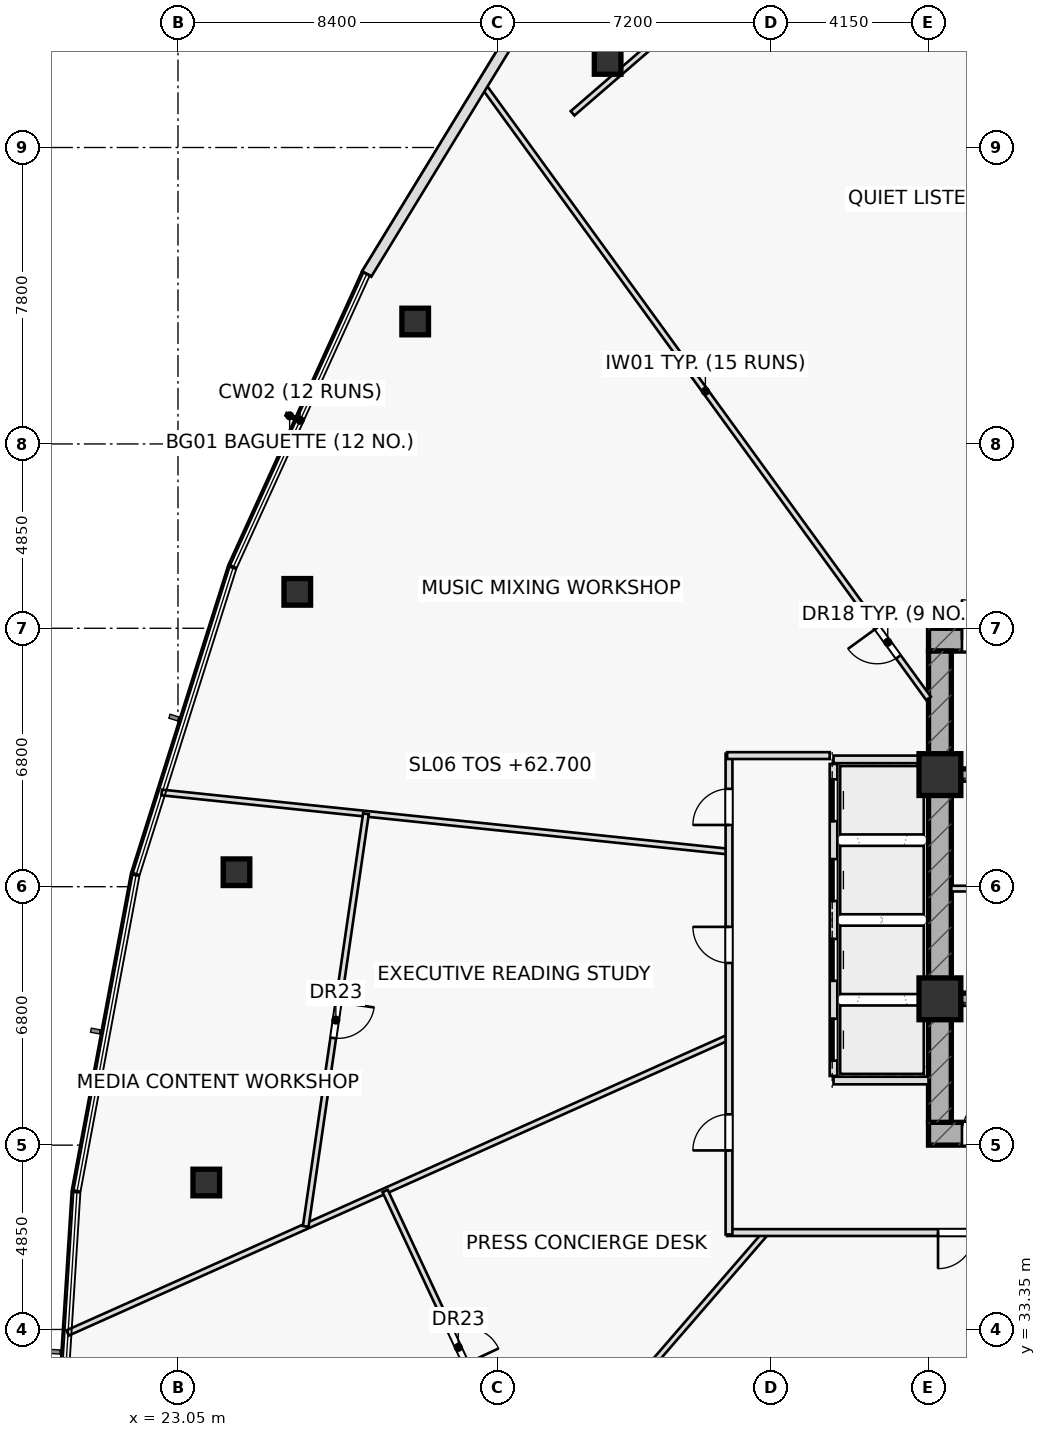
"""IFC4 building model, lengths in metres.
Left out: names, types, materials, properties, quantities, classifications, styles, units other than length and angle.
Written with IfcOpenShell. Run it as: python <this file> out.ifc"""

import sys

from ifc_helpers import new_model, si_unit, direction, frame, frame_2d, origin, origin_2d, place, context, subcontext, project, spatial, rectangle, hollow_rectangle, extrude, element, fill, save


model = new_model("IFC4")
c1 = context("Model", 3, precision=1e-05, world=origin(), true_north=direction((0.0, 1.0)))
c2 = subcontext(c1, "Body", "Model", "MODEL_VIEW")
j1 = project(units=[si_unit("LENGTHUNIT", "METRE"), si_unit("PLANEANGLEUNIT", "RADIAN")], contexts=[c1])
p1 = place(None, origin())
s1 = spatial("IfcSite", under=j1, at=p1, CompositionType="ELEMENT")
p2 = place(p1, origin())
s2 = spatial("IfcBuilding", under=s1, at=p2, CompositionType="ELEMENT")
p3 = place(p2, frame((0.0, 0.0, 62.7)))
s3 = spatial("IfcBuildingStorey", under=s2, at=p3, CompositionType="ELEMENT", Elevation=62.7)
p4 = place(p3, frame((42.8, 51.5, 0.0), z_axis=(0.0, 0.0, 1.0), x_axis=(1.0, 0.0, 0.0)))
e1 = element("IfcWall", 1, at=p4, inside=s3, PredefinedType="SHEAR", context=c2, shape_type="SweptSolid", body=[
    extrude(rectangle(XDim=14.4, YDim=0.6, at=frame_2d((7.2, 0.0))), origin(), (0.0, 0.0, 1.0), 3.6),
])
p5 = place(p4, frame((0.88, 0.0, 0.0)))
e2 = element("IfcOpeningElement", 2, at=p5, cuts=e1, PredefinedType="OPENING", context=c2, shape_type="SweptSolid", body=[
    extrude(rectangle(XDim=1.05, YDim=2.2, at=frame_2d((0.525, 1.1))), frame((0.0, 0.31, 0.0), z_axis=(0.0, -1.0, 0.0), x_axis=(1.0, 0.0, 0.0)), (0.0, 0.0, 1.0), 0.62),
])
p6 = place(p3, frame((42.8, 38.5, 0.0), z_axis=(0.0, 0.0, 1.0), x_axis=(1.0, 0.0, 0.0)))
e3 = element("IfcWall", 3, at=p6, inside=s3, PredefinedType="SHEAR", context=c2, shape_type="SweptSolid", body=[
    extrude(rectangle(XDim=14.4, YDim=0.6, at=frame_2d((7.2, 0.0))), origin(), (0.0, 0.0, 1.0), 3.6),
])
p7 = place(p6, frame((0.88, 0.0, 0.0)))
e4 = element("IfcOpeningElement", 4, at=p7, cuts=e3, PredefinedType="OPENING", context=c2, shape_type="SweptSolid", body=[
    extrude(rectangle(XDim=1.05, YDim=2.2, at=frame_2d((0.525, 1.1))), frame((0.0, 0.31, 0.0), z_axis=(0.0, -1.0, 0.0), x_axis=(1.0, 0.0, 0.0)), (0.0, 0.0, 1.0), 0.62),
])
p8 = place(p3, frame((43.1, 38.8, 0.0), z_axis=(0.0, 0.0, 1.0), x_axis=(0.0, 1.0, 0.0)))
e5 = element("IfcWall", 5, at=p8, inside=s3, PredefinedType="SHEAR", context=c2, shape_type="SweptSolid", body=[
    extrude(rectangle(XDim=12.4, YDim=0.6, at=frame_2d((6.2, 0.0))), origin(), (0.0, 0.0, 1.0), 3.6),
])
p9 = place(p3, frame((43.4, 47.95, 0.0), z_axis=(0.0, 0.0, 1.0), x_axis=(1.0, 0.0, 0.0)))
e6 = element("IfcWall", 6, at=p9, inside=s3, PredefinedType="SHEAR", context=c2, shape_type="SweptSolid", body=[
    extrude(rectangle(XDim=13.2, YDim=0.3, at=frame_2d((6.6, 0.0))), origin(), (0.0, 0.0, 1.0), 3.6),
])
p10 = place(p9, frame((8.345, 0.0, 0.0)))
e7 = element("IfcOpeningElement", 7, at=p10, cuts=e6, PredefinedType="OPENING", context=c2, shape_type="SweptSolid", body=[
    extrude(rectangle(XDim=1.15, YDim=2.2, at=frame_2d((0.575, 1.1))), frame((0.0, 0.16, 0.0), z_axis=(0.0, -1.0, 0.0), x_axis=(1.0, 0.0, 0.0)), (0.0, 0.0, 1.0), 0.32),
])
p11 = place(p9, frame((10.065, 0.0, 0.0)))
e8 = element("IfcOpeningElement", 8, at=p11, cuts=e6, PredefinedType="OPENING", context=c2, shape_type="SweptSolid", body=[
    extrude(rectangle(XDim=1.15, YDim=2.2, at=frame_2d((0.575, 1.1))), frame((0.0, 0.16, 0.0), z_axis=(0.0, -1.0, 0.0), x_axis=(1.0, 0.0, 0.0)), (0.0, 0.0, 1.0), 0.32),
])
p12 = place(p9, frame((11.645, 0.0, 0.0)))
e9 = element("IfcOpeningElement", 9, at=p12, cuts=e6, PredefinedType="OPENING", context=c2, shape_type="SweptSolid", body=[
    extrude(rectangle(XDim=1.15, YDim=2.2, at=frame_2d((0.575, 1.1))), frame((0.0, 0.16, 0.0), z_axis=(0.0, -1.0, 0.0), x_axis=(1.0, 0.0, 0.0)), (0.0, 0.0, 1.0), 0.32),
])
p13 = place(p3, frame((43.4, 42.05, 0.0), z_axis=(0.0, 0.0, 1.0), x_axis=(1.0, 0.0, 0.0)))
e10 = element("IfcWall", 10, at=p13, inside=s3, PredefinedType="SHEAR", context=c2, shape_type="SweptSolid", body=[
    extrude(rectangle(XDim=13.2, YDim=0.3, at=frame_2d((6.6, 0.0))), origin(), (0.0, 0.0, 1.0), 3.6),
])
for number, where, z_axis, x_axis in (
    (11, (43.1, 47.95, 0.0), (0.0, 0.0, 1.0), (1.0, 0.0, 0.0)),
    (12, (43.1, 42.05, 0.0), (0.0, 0.0, 1.0), (1.0, 0.0, 0.0)),
):
    element("IfcColumn", number, at=place(p3, frame(where, z_axis=z_axis, x_axis=x_axis)), inside=s3, PredefinedType="COLUMN", context=c2, shape_type="SweptSolid", body=[
        extrude(rectangle(XDim=1.1, YDim=1.1, at=origin_2d()), origin(), (0.0, 0.0, 1.0), 3.6),
    ])
for number, where, z_axis, x_axis in (
    (13, (34.356, 66.728, 0.0), (0.0, 0.0, 1.0), (1.0, 0.0, 0.0)),
    (14, (29.292, 59.872, 0.0), (0.0, 0.0, 1.0), (1.0, 0.0, 0.0)),
    (15, (26.189, 52.758, 0.0), (0.0, 0.0, 1.0), (1.0, 0.0, 0.0)),
    (16, (24.59, 45.381, 0.0), (0.0, 0.0, 1.0), (1.0, 0.0, 0.0)),
    (17, (23.795, 37.216, 0.0), (0.0, 0.0, 1.0), (1.0, 0.0, 0.0)),
):
    element("IfcColumn", number, at=place(p3, frame(where, z_axis=z_axis, x_axis=x_axis)), inside=s3, PredefinedType="COLUMN", context=c2, shape_type="SweptSolid", body=[
        extrude(hollow_rectangle(XDim=0.7, YDim=0.7, WallThickness=0.04, at=origin_2d()), origin(), (0.0, 0.0, 1.0), 3.6),
    ])
for number, where, z_axis, x_axis in (
    (18, (40.3, 39.9, 0.0), (0.0, 0.0, 1.0), (1.0, 0.0, 0.0)),
    (19, (40.3, 48.35, 0.0), (0.0, 0.0, 1.0), (1.0, 0.0, 0.0)),
):
    element("IfcWall", number, at=place(p3, frame(where, z_axis=z_axis, x_axis=x_axis)), inside=s3, PredefinedType="PARTITIONING", context=c2, shape_type="SweptSolid", body=[
        extrude(rectangle(XDim=2.5, YDim=0.2, at=frame_2d((1.25, 0.0))), origin(), (0.0, 0.0, 1.0), 3.6),
    ])
p14 = place(p3, frame((43.4, 44.95, 0.0), z_axis=(0.0, 0.0, 1.0), x_axis=(1.0, 0.0, 0.0)))
e20 = element("IfcWall", 20, at=p14, inside=s3, PredefinedType="PARTITIONING", context=c2, shape_type="SweptSolid", body=[
    extrude(rectangle(XDim=2.35, YDim=0.15, at=frame_2d((1.175, 0.0))), origin(), (0.0, 0.0, 1.0), 3.6),
])
p15 = place(p3, frame((43.421, 73.979, 0.0), z_axis=(0.0, 0.0, 1.0), x_axis=(-0.756659135409, -0.653809569218, 0.0)))
e21 = element("IfcWall", 21, at=p15, inside=s3, PredefinedType="PARTITIONING", context=c2, shape_type="SweptSolid", body=[
    extrude(rectangle(XDim=13.2, YDim=0.15, at=frame_2d((6.6, 0.0))), origin(), (0.0, 0.0, 1.0), 2.975),
])
p16 = place(p3, frame((42.8, 49.955, 0.0), z_axis=(0.0, 0.0, 1.0), x_axis=(-0.587790891167, 0.809012897463, 0.0)))
e22 = element("IfcWall", 22, at=p16, inside=s3, PredefinedType="PARTITIONING", context=c2, shape_type="SweptSolid", body=[
    extrude(rectangle(XDim=19.979, YDim=0.15, at=frame_2d((9.989, 0.0))), origin(), (0.0, 0.0, 1.0), 2.975),
])
p17 = place(p16, frame((1.35, 0.0, 0.0)))
e23 = element("IfcOpeningElement", 23, at=p17, cuts=e22, PredefinedType="OPENING", context=c2, shape_type="SweptSolid", body=[
    extrude(rectangle(XDim=0.95, YDim=2.05, at=frame_2d((0.475, 1.025))), frame((0.0, 0.085, 0.0), z_axis=(0.0, -1.0, 0.0), x_axis=(1.0, 0.0, 0.0)), (0.0, 0.0, 1.0), 0.17),
])
p18 = place(p3, frame((37.55, 45.923, 0.0), z_axis=(0.0, 0.0, 1.0), x_axis=(-0.994605270282, 0.10373213739, 0.0)))
e24 = element("IfcWall", 24, at=p18, inside=s3, PredefinedType="PARTITIONING", context=c2, shape_type="SweptSolid", body=[
    extrude(rectangle(XDim=15.009, YDim=0.15, at=frame_2d((7.504, 0.0))), origin(), (0.0, 0.0, 1.0), 2.975),
])
p19 = place(p3, frame((37.55, 41.042, 0.0), z_axis=(0.0, 0.0, 1.0), x_axis=(-0.912860583098, -0.408271424211, 0.0)))
e25 = element("IfcWall", 25, at=p19, inside=s3, PredefinedType="PARTITIONING", context=c2, shape_type="SweptSolid", body=[
    extrude(rectangle(XDim=19.064, YDim=0.15, at=frame_2d((9.532, 0.0))), origin(), (0.0, 0.0, 1.0), 2.975),
])
p20 = place(p3, frame((38.526, 35.9, 0.0), z_axis=(0.0, 0.0, 1.0), x_axis=(-0.654326006544, -0.75621258728, 0.0)))
e26 = element("IfcWall", 26, at=p20, inside=s3, PredefinedType="PARTITIONING", context=c2, shape_type="SweptSolid", body=[
    extrude(rectangle(XDim=18.149, YDim=0.15, at=frame_2d((9.074, 0.0))), origin(), (0.0, 0.0, 1.0), 2.975),
])
p21 = place(p3, frame((27.996, 46.919, 0.0), z_axis=(0.0, 0.0, 1.0), x_axis=(-0.144345470149, -0.989527354472, 0.0)))
e27 = element("IfcWall", 27, at=p21, inside=s3, PredefinedType="PARTITIONING", context=c2, shape_type="SweptSolid", body=[
    extrude(rectangle(XDim=10.974, YDim=0.15, at=frame_2d((5.487, 0.0))), origin(), (0.0, 0.0, 1.0), 2.975),
])
p22 = place(p21, frame((5.012, 0.0, 0.0)))
e28 = element("IfcOpeningElement", 28, at=p22, cuts=e27, PredefinedType="OPENING", context=c2, shape_type="SweptSolid", body=[
    extrude(rectangle(XDim=0.95, YDim=2.05, at=frame_2d((0.475, 1.025))), frame((0.0, 0.085, 0.0), z_axis=(0.0, -1.0, 0.0), x_axis=(1.0, 0.0, 0.0)), (0.0, 0.0, 1.0), 0.17),
])
p23 = place(p3, frame((28.501, 36.995, 0.0), z_axis=(0.0, 0.0, 1.0), x_axis=(0.423698619108, -0.905803223756, 0.0)))
e29 = element("IfcWall", 29, at=p23, inside=s3, PredefinedType="PARTITIONING", context=c2, shape_type="SweptSolid", body=[
    extrude(rectangle(XDim=9.087, YDim=0.15, at=frame_2d((4.544, 0.0))), origin(), (0.0, 0.0, 1.0), 2.975),
])
p24 = place(p23, frame((4.069, 0.0, 0.0)))
e30 = element("IfcOpeningElement", 30, at=p24, cuts=e29, PredefinedType="OPENING", context=c2, shape_type="SweptSolid", body=[
    extrude(rectangle(XDim=0.95, YDim=2.05, at=frame_2d((0.475, 1.025))), frame((0.0, 0.085, 0.0), z_axis=(0.0, -1.0, 0.0), x_axis=(1.0, 0.0, 0.0)), (0.0, 0.0, 1.0), 0.17),
])
p25 = place(p3, frame((59.55, 35.9, 0.0), z_axis=(0.0, 0.0, 1.0), x_axis=(-1.0, 0.0, 0.0)))
e31 = element("IfcWall", 31, at=p25, inside=s3, PredefinedType="PARTITIONING", context=c2, shape_type="SweptSolid", body=[
    extrude(rectangle(XDim=22.05, YDim=0.18, at=frame_2d((11.025, 0.0))), origin(), (0.0, 0.0, 1.0), 2.975),
])
p26 = place(p25, frame((5.11, 0.0, 0.0)))
e32 = element("IfcOpeningElement", 32, at=p26, cuts=e31, PredefinedType="OPENING", context=c2, shape_type="SweptSolid", body=[
    extrude(rectangle(XDim=0.95, YDim=2.05, at=frame_2d((0.475, 1.025))), frame((0.0, 0.1, 0.0), z_axis=(0.0, -1.0, 0.0), x_axis=(1.0, 0.0, 0.0)), (0.0, 0.0, 1.0), 0.2),
])
p27 = place(p25, frame((15.55, 0.0, 0.0)))
e33 = element("IfcOpeningElement", 33, at=p27, cuts=e31, PredefinedType="OPENING", context=c2, shape_type="SweptSolid", body=[
    extrude(rectangle(XDim=0.95, YDim=2.05, at=frame_2d((0.475, 1.025))), frame((0.0, 0.1, 0.0), z_axis=(0.0, -1.0, 0.0), x_axis=(1.0, 0.0, 0.0)), (0.0, 0.0, 1.0), 0.2),
])
p28 = place(p3, frame((37.55, 35.85, 0.0), z_axis=(0.0, 0.0, 1.0), x_axis=(0.0, 1.0, 0.0)))
e34 = element("IfcWall", 34, at=p28, inside=s3, PredefinedType="PARTITIONING", context=c2, shape_type="SweptSolid", body=[
    extrude(rectangle(XDim=12.65, YDim=0.18, at=frame_2d((6.325, 0.0))), origin(), (0.0, 0.0, 1.0), 2.975),
])
p29 = place(p28, frame((2.211, 0.0, 0.0)))
e35 = element("IfcOpeningElement", 35, at=p29, cuts=e34, PredefinedType="OPENING", context=c2, shape_type="SweptSolid", body=[
    extrude(rectangle(XDim=0.95, YDim=2.05, at=frame_2d((0.475, 1.025))), frame((0.0, 0.1, 0.0), z_axis=(0.0, -1.0, 0.0), x_axis=(1.0, 0.0, 0.0)), (0.0, 0.0, 1.0), 0.2),
])
p30 = place(p28, frame((7.143, 0.0, 0.0)))
e36 = element("IfcOpeningElement", 36, at=p30, cuts=e34, PredefinedType="OPENING", context=c2, shape_type="SweptSolid", body=[
    extrude(rectangle(XDim=0.95, YDim=2.05, at=frame_2d((0.475, 1.025))), frame((0.0, 0.1, 0.0), z_axis=(0.0, -1.0, 0.0), x_axis=(1.0, 0.0, 0.0)), (0.0, 0.0, 1.0), 0.2),
])
p31 = place(p28, frame((10.774, 0.0, 0.0)))
e37 = element("IfcOpeningElement", 37, at=p31, cuts=e34, PredefinedType="OPENING", context=c2, shape_type="SweptSolid", body=[
    extrude(rectangle(XDim=0.95, YDim=2.05, at=frame_2d((0.475, 1.025))), frame((0.0, 0.1, 0.0), z_axis=(0.0, -1.0, 0.0), x_axis=(1.0, 0.0, 0.0)), (0.0, 0.0, 1.0), 0.2),
])
p32 = place(p3, frame((37.5, 48.45, 0.0), z_axis=(0.0, 0.0, 1.0), x_axis=(1.0, 0.0, 0.0)))
e38 = element("IfcWall", 38, at=p32, inside=s3, PredefinedType="PARTITIONING", context=c2, shape_type="SweptSolid", body=[
    extrude(rectangle(XDim=2.7, YDim=0.18, at=frame_2d((1.35, 0.0))), origin(), (0.0, 0.0, 1.0), 3.6),
])
p33 = place(p3, frame((32.449, 68.376, 0.0), z_axis=(0.0, 0.0, 1.0), x_axis=(-0.521417484471, -0.853301709179, 0.0)))
e39 = element("IfcWall", 39, at=p33, inside=s3, PredefinedType="STANDARD", context=c2, shape_type="SweptSolid", body=[
    extrude(rectangle(XDim=8.501, YDim=0.28, at=frame_2d((4.251, 0.0))), origin(), (0.0, 0.0, 1.0), 3.6),
])
p34 = place(p3, frame((40.3, 40.02, 0.0), z_axis=(0.0, 0.0, 1.0), x_axis=(0.0, 1.0, 0.0)))
e40 = element("IfcWall", 40, at=p34, inside=s3, PredefinedType="PARTITIONING", context=c2, shape_type="SweptSolid", body=[
    extrude(rectangle(XDim=8.21, YDim=0.2, at=frame_2d((4.105, 0.0))), origin(), (0.0, 0.0, 1.0), 3.6),
])
p35 = place(p34, frame((0.405, 0.0, 0.0)))
e41 = element("IfcOpeningElement", 41, at=p35, cuts=e40, PredefinedType="OPENING", context=c2, shape_type="SweptSolid", body=[
    extrude(rectangle(XDim=1.1, YDim=2.15, at=frame_2d((0.55, 1.075))), frame((0.0, 0.11, 0.0), z_axis=(0.0, -1.0, 0.0), x_axis=(1.0, 0.0, 0.0)), (0.0, 0.0, 1.0), 0.22),
])
p36 = place(p34, frame((2.505, 0.0, 0.0)))
e42 = element("IfcOpeningElement", 42, at=p36, cuts=e40, PredefinedType="OPENING", context=c2, shape_type="SweptSolid", body=[
    extrude(rectangle(XDim=1.1, YDim=2.15, at=frame_2d((0.55, 1.075))), frame((0.0, 0.11, 0.0), z_axis=(0.0, -1.0, 0.0), x_axis=(1.0, 0.0, 0.0)), (0.0, 0.0, 1.0), 0.22),
])
p37 = place(p34, frame((4.605, 0.0, 0.0)))
e43 = element("IfcOpeningElement", 43, at=p37, cuts=e40, PredefinedType="OPENING", context=c2, shape_type="SweptSolid", body=[
    extrude(rectangle(XDim=1.1, YDim=2.15, at=frame_2d((0.55, 1.075))), frame((0.0, 0.11, 0.0), z_axis=(0.0, -1.0, 0.0), x_axis=(1.0, 0.0, 0.0)), (0.0, 0.0, 1.0), 0.22),
])
p38 = place(p34, frame((6.705, 0.0, 0.0)))
e44 = element("IfcOpeningElement", 44, at=p38, cuts=e40, PredefinedType="OPENING", context=c2, shape_type="SweptSolid", body=[
    extrude(rectangle(XDim=1.1, YDim=2.15, at=frame_2d((0.55, 1.075))), frame((0.0, 0.11, 0.0), z_axis=(0.0, -1.0, 0.0), x_axis=(1.0, 0.0, 0.0)), (0.0, 0.0, 1.0), 0.22),
])
p39 = place(p5, origin())
e45 = element("IfcDoor", 45, at=p39, inside=s3, OperationType="SINGLE_SWING_LEFT", PredefinedType="DOOR", context=c2, shape_type="SweptSolid", body=[
    extrude(rectangle(XDim=1.05, YDim=2.2, at=frame_2d((0.525, 1.1))), frame((0.0, 0.025, 0.0), z_axis=(0.0, -1.0, 0.0), x_axis=(1.0, 0.0, 0.0)), (0.0, 0.0, 1.0), 0.05),
])
fill(e2, e45)
p40 = place(p7, origin())
e46 = element("IfcDoor", 46, at=p40, inside=s3, OperationType="SINGLE_SWING_RIGHT", PredefinedType="DOOR", context=c2, shape_type="SweptSolid", body=[
    extrude(rectangle(XDim=1.05, YDim=2.2, at=frame_2d((0.525, 1.1))), frame((0.0, 0.025, 0.0), z_axis=(0.0, -1.0, 0.0), x_axis=(1.0, 0.0, 0.0)), (0.0, 0.0, 1.0), 0.05),
])
fill(e4, e46)
p41 = place(p17, origin())
e47 = element("IfcDoor", 47, at=p41, inside=s3, OperationType="SINGLE_SWING_RIGHT", PredefinedType="DOOR", context=c2, shape_type="SweptSolid", body=[
    extrude(rectangle(XDim=0.95, YDim=2.05, at=frame_2d((0.475, 1.025))), frame((0.0, 0.025, 0.0), z_axis=(0.0, -1.0, 0.0), x_axis=(1.0, 0.0, 0.0)), (0.0, 0.0, 1.0), 0.05),
])
fill(e23, e47)
p42 = place(p22, origin())
e48 = element("IfcDoor", 48, at=p42, inside=s3, OperationType="SINGLE_SWING_LEFT", PredefinedType="DOOR", context=c2, shape_type="SweptSolid", body=[
    extrude(rectangle(XDim=0.95, YDim=2.05, at=frame_2d((0.475, 1.025))), frame((0.0, 0.025, 0.0), z_axis=(0.0, -1.0, 0.0), x_axis=(1.0, 0.0, 0.0)), (0.0, 0.0, 1.0), 0.05),
])
fill(e28, e48)
p43 = place(p24, origin())
e49 = element("IfcDoor", 49, at=p43, inside=s3, OperationType="SINGLE_SWING_RIGHT", PredefinedType="DOOR", context=c2, shape_type="SweptSolid", body=[
    extrude(rectangle(XDim=0.95, YDim=2.05, at=frame_2d((0.475, 1.025))), frame((0.0, 0.025, 0.0), z_axis=(0.0, -1.0, 0.0), x_axis=(1.0, 0.0, 0.0)), (0.0, 0.0, 1.0), 0.05),
])
fill(e30, e49)
p44 = place(p27, origin())
e50 = element("IfcDoor", 50, at=p44, inside=s3, OperationType="SINGLE_SWING_RIGHT", PredefinedType="DOOR", context=c2, shape_type="SweptSolid", body=[
    extrude(rectangle(XDim=0.95, YDim=2.05, at=frame_2d((0.475, 1.025))), frame((0.0, 0.025, 0.0), z_axis=(0.0, -1.0, 0.0), x_axis=(1.0, 0.0, 0.0)), (0.0, 0.0, 1.0), 0.05),
])
fill(e33, e50)
p45 = place(p29, origin())
e51 = element("IfcDoor", 51, at=p45, inside=s3, OperationType="SINGLE_SWING_LEFT", PredefinedType="DOOR", context=c2, shape_type="SweptSolid", body=[
    extrude(rectangle(XDim=0.95, YDim=2.05, at=frame_2d((0.475, 1.025))), frame((0.0, 0.025, 0.0), z_axis=(0.0, -1.0, 0.0), x_axis=(1.0, 0.0, 0.0)), (0.0, 0.0, 1.0), 0.05),
])
fill(e35, e51)
p46 = place(p30, origin())
e52 = element("IfcDoor", 52, at=p46, inside=s3, OperationType="SINGLE_SWING_RIGHT", PredefinedType="DOOR", context=c2, shape_type="SweptSolid", body=[
    extrude(rectangle(XDim=0.95, YDim=2.05, at=frame_2d((0.475, 1.025))), frame((0.0, 0.025, 0.0), z_axis=(0.0, -1.0, 0.0), x_axis=(1.0, 0.0, 0.0)), (0.0, 0.0, 1.0), 0.05),
])
fill(e36, e52)
p47 = place(p31, origin())
e53 = element("IfcDoor", 53, at=p47, inside=s3, OperationType="SINGLE_SWING_LEFT", PredefinedType="DOOR", context=c2, shape_type="SweptSolid", body=[
    extrude(rectangle(XDim=0.95, YDim=2.05, at=frame_2d((0.475, 1.025))), frame((0.0, 0.025, 0.0), z_axis=(0.0, -1.0, 0.0), x_axis=(1.0, 0.0, 0.0)), (0.0, 0.0, 1.0), 0.05),
])
fill(e37, e53)
p48 = place(p35, origin())
e54 = element("IfcDoor", 54, at=p48, inside=s3, OperationType="SLIDING_TO_LEFT", PredefinedType="DOOR", context=c2, shape_type="SweptSolid", body=[
    extrude(rectangle(XDim=1.1, YDim=2.15, at=frame_2d((0.55, 1.075))), frame((0.0, 0.025, 0.0), z_axis=(0.0, -1.0, 0.0), x_axis=(1.0, 0.0, 0.0)), (0.0, 0.0, 1.0), 0.05),
])
fill(e41, e54)
p49 = place(p36, origin())
e55 = element("IfcDoor", 55, at=p49, inside=s3, OperationType="SLIDING_TO_RIGHT", PredefinedType="DOOR", context=c2, shape_type="SweptSolid", body=[
    extrude(rectangle(XDim=1.1, YDim=2.15, at=frame_2d((0.55, 1.075))), frame((0.0, 0.025, 0.0), z_axis=(0.0, -1.0, 0.0), x_axis=(1.0, 0.0, 0.0)), (0.0, 0.0, 1.0), 0.05),
])
fill(e42, e55)
p50 = place(p37, origin())
e56 = element("IfcDoor", 56, at=p50, inside=s3, OperationType="SLIDING_TO_LEFT", PredefinedType="DOOR", context=c2, shape_type="SweptSolid", body=[
    extrude(rectangle(XDim=1.1, YDim=2.15, at=frame_2d((0.55, 1.075))), frame((0.0, 0.025, 0.0), z_axis=(0.0, -1.0, 0.0), x_axis=(1.0, 0.0, 0.0)), (0.0, 0.0, 1.0), 0.05),
])
fill(e43, e56)
p51 = place(p38, origin())
e57 = element("IfcDoor", 57, at=p51, inside=s3, OperationType="SLIDING_TO_RIGHT", PredefinedType="DOOR", context=c2, shape_type="SweptSolid", body=[
    extrude(rectangle(XDim=1.1, YDim=2.15, at=frame_2d((0.55, 1.075))), frame((0.0, 0.025, 0.0), z_axis=(0.0, -1.0, 0.0), x_axis=(1.0, 0.0, 0.0)), (0.0, 0.0, 1.0), 0.05),
])
fill(e44, e57)
save(model, sys.argv[1])
